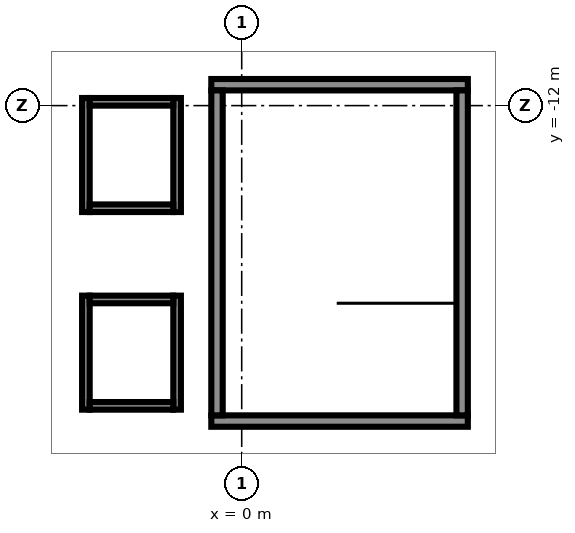
"""IFC4 building model, lengths in metres.
Left out: names, types, materials, properties, quantities, classifications, styles, units other than length and angle.
Written with IfcOpenShell. Run it as: python <this file> out.ifc"""

import sys

from ifc_helpers import new_model, si_unit, direction, frame, frame_2d, origin, origin_2d, place, context, subcontext, project, spatial, rectangle, extrude, element, fill, save


model = new_model("IFC4")
c1 = context("Model", 3, precision=1e-05, world=origin(), true_north=direction((0.0, 1.0)))
c2 = subcontext(c1, "Body", "Model", "MODEL_VIEW")
j1 = project(units=[si_unit("LENGTHUNIT", "METRE"), si_unit("PLANEANGLEUNIT", "RADIAN")], contexts=[c1])
p1 = place(None, origin())
s1 = spatial("IfcSite", under=j1, at=p1, CompositionType="ELEMENT")
p2 = place(p1, origin())
s2 = spatial("IfcBuilding", under=s1, at=p2, CompositionType="ELEMENT")
p3 = place(p2, origin())
s3 = spatial("IfcBuildingStorey", under=s2, at=p3, CompositionType="ELEMENT", Elevation=0.0)
p4 = place(p3, frame((-5.0, -17.0, 0.0), z_axis=(0.0, 0.0, 1.0), x_axis=(1.0, 0.0, 0.0)))
e1 = element("IfcColumn", 1, at=p4, inside=s3, PredefinedType="COLUMN", context=c2, shape_type="SweptSolid", body=[
    extrude(rectangle(XDim=1.0, YDim=1.0, at=origin_2d()), origin(), (0.0, 0.0, 1.0), 8.0),
])
p5 = place(p3, frame((-0.8, -20.3, 0.0), z_axis=(0.0, 0.0, 1.0), x_axis=(1.0, 0.0, 0.0)))
e2 = element("IfcWall", 2, at=p5, inside=s3, PredefinedType="SHEAR", context=c2, shape_type="SweptSolid", body=[
    extrude(rectangle(XDim=6.75, YDim=0.3, at=frame_2d((3.375, 0.0))), origin(), (0.0, 0.0, 1.0), 7.7),
])
p6 = place(p5, frame((2.175, 0.0, 0.0)))
e3 = element("IfcOpeningElement", 3, at=p6, cuts=e2, PredefinedType="OPENING", context=c2, shape_type="SweptSolid", body=[
    extrude(rectangle(XDim=2.4, YDim=2.1, at=frame_2d((1.2, 1.05))), frame((0.0, 0.16, 0.0), z_axis=(0.0, -1.0, 0.0), x_axis=(1.0, 0.0, 0.0)), (0.0, 0.0, 1.0), 0.32),
])
p7 = place(p3, frame((-0.8, -11.45, 0.0), z_axis=(0.0, 0.0, 1.0), x_axis=(1.0, 0.0, 0.0)))
e4 = element("IfcWall", 4, at=p7, inside=s3, PredefinedType="SHEAR", context=c2, shape_type="SweptSolid", body=[
    extrude(rectangle(XDim=6.75, YDim=0.3, at=frame_2d((3.375, 0.0))), origin(), (0.0, 0.0, 1.0), 7.7),
])
for number, where, z_axis, x_axis in (
    (5, (-0.65, -20.15, 0.0), (0.0, 0.0, 1.0), (0.0, 1.0, 0.0)),
    (6, (5.8, -20.15, 0.0), (0.0, 0.0, 1.0), (0.0, 1.0, 0.0)),
):
    element("IfcWall", number, at=place(p3, frame(where, z_axis=z_axis, x_axis=x_axis)), inside=s3, PredefinedType="SHEAR", context=c2, shape_type="SweptSolid", body=[
        extrude(rectangle(XDim=8.55, YDim=0.3, at=frame_2d((4.275, 0.0))), origin(), (0.0, 0.0, 1.0), 7.7),
    ])
p8 = place(p3, frame((-4.1, -20.0, 0.0), z_axis=(0.0, 0.0, 1.0), x_axis=(0.0, 1.0, 0.0)))
e7 = element("IfcWall", 7, at=p8, inside=s3, PredefinedType="PARTITIONING", context=c2, shape_type="SweptSolid", body=[
    extrude(rectangle(XDim=3.0, YDim=0.2, at=frame_2d((1.5, 0.0))), origin(), (0.0, 0.0, 1.0), 7.7),
])
p9 = place(p3, frame((-1.7, -20.0, 0.0), z_axis=(0.0, 0.0, 1.0), x_axis=(0.0, 1.0, 0.0)))
e8 = element("IfcWall", 8, at=p9, inside=s3, PredefinedType="PARTITIONING", context=c2, shape_type="SweptSolid", body=[
    extrude(rectangle(XDim=3.0, YDim=0.2, at=frame_2d((1.5, 0.0))), origin(), (0.0, 0.0, 1.0), 7.7),
])
p10 = place(p9, frame((0.95, 0.0, 0.0)))
e9 = element("IfcOpeningElement", 9, at=p10, cuts=e8, PredefinedType="OPENING", context=c2, shape_type="SweptSolid", body=[
    extrude(rectangle(XDim=1.1, YDim=2.1, at=frame_2d((0.55, 1.05))), frame((0.0, 0.11, 0.0), z_axis=(0.0, -1.0, 0.0), x_axis=(1.0, 0.0, 0.0)), (0.0, 0.0, 1.0), 0.22),
])
for number, where, z_axis, x_axis in (
    (10, (-4.0, -19.9, 0.0), (0.0, 0.0, 1.0), (1.0, 0.0, 0.0)),
    (11, (-4.0, -17.1, 0.0), (0.0, 0.0, 1.0), (1.0, 0.0, 0.0)),
):
    element("IfcWall", number, at=place(p3, frame(where, z_axis=z_axis, x_axis=x_axis)), inside=s3, PredefinedType="PARTITIONING", context=c2, shape_type="SweptSolid", body=[
        extrude(rectangle(XDim=2.2, YDim=0.2, at=frame_2d((1.1, 0.0))), origin(), (0.0, 0.0, 1.0), 7.7),
    ])
p11 = place(p3, frame((-4.1, -14.8, 0.0), z_axis=(0.0, 0.0, 1.0), x_axis=(0.0, 1.0, 0.0)))
e12 = element("IfcWall", 12, at=p11, inside=s3, PredefinedType="PARTITIONING", context=c2, shape_type="SweptSolid", body=[
    extrude(rectangle(XDim=3.0, YDim=0.2, at=frame_2d((1.5, 0.0))), origin(), (0.0, 0.0, 1.0), 7.7),
])
p12 = place(p3, frame((-1.7, -14.8, 0.0), z_axis=(0.0, 0.0, 1.0), x_axis=(0.0, 1.0, 0.0)))
e13 = element("IfcWall", 13, at=p12, inside=s3, PredefinedType="PARTITIONING", context=c2, shape_type="SweptSolid", body=[
    extrude(rectangle(XDim=3.0, YDim=0.2, at=frame_2d((1.5, 0.0))), origin(), (0.0, 0.0, 1.0), 7.7),
])
p13 = place(p12, frame((0.95, 0.0, 0.0)))
e14 = element("IfcOpeningElement", 14, at=p13, cuts=e13, PredefinedType="OPENING", context=c2, shape_type="SweptSolid", body=[
    extrude(rectangle(XDim=1.1, YDim=2.1, at=frame_2d((0.55, 1.05))), frame((0.0, 0.11, 0.0), z_axis=(0.0, -1.0, 0.0), x_axis=(1.0, 0.0, 0.0)), (0.0, 0.0, 1.0), 0.22),
])
for number, where, z_axis, x_axis in (
    (15, (-4.0, -14.7, 0.0), (0.0, 0.0, 1.0), (1.0, 0.0, 0.0)),
    (16, (-4.0, -11.9, 0.0), (0.0, 0.0, 1.0), (1.0, 0.0, 0.0)),
):
    element("IfcWall", number, at=place(p3, frame(where, z_axis=z_axis, x_axis=x_axis)), inside=s3, PredefinedType="PARTITIONING", context=c2, shape_type="SweptSolid", body=[
        extrude(rectangle(XDim=2.2, YDim=0.2, at=frame_2d((1.1, 0.0))), origin(), (0.0, 0.0, 1.0), 7.7),
    ])
p14 = place(p6, origin())
e17 = element("IfcDoor", 17, at=p14, inside=s3, OperationType="DOUBLE_DOOR_SINGLE_SWING", PredefinedType="DOOR", context=c2, shape_type="SweptSolid", body=[
    extrude(rectangle(XDim=2.4, YDim=2.1, at=frame_2d((1.2, 1.05))), frame((0.0, 0.025, 0.0), z_axis=(0.0, -1.0, 0.0), x_axis=(1.0, 0.0, 0.0)), (0.0, 0.0, 1.0), 0.05),
])
fill(e3, e17)
p15 = place(p10, origin())
e18 = element("IfcDoor", 18, at=p15, inside=s3, OperationType="DOUBLE_DOOR_SLIDING", PredefinedType="DOOR", context=c2, shape_type="SweptSolid", body=[
    extrude(rectangle(XDim=1.1, YDim=2.1, at=frame_2d((0.55, 1.05))), frame((0.0, 0.025, 0.0), z_axis=(0.0, -1.0, 0.0), x_axis=(1.0, 0.0, 0.0)), (0.0, 0.0, 1.0), 0.05),
])
fill(e9, e18)
p16 = place(p13, origin())
e19 = element("IfcDoor", 19, at=p16, inside=s3, OperationType="DOUBLE_DOOR_SLIDING", PredefinedType="DOOR", context=c2, shape_type="SweptSolid", body=[
    extrude(rectangle(XDim=1.1, YDim=2.1, at=frame_2d((0.55, 1.05))), frame((0.0, 0.025, 0.0), z_axis=(0.0, -1.0, 0.0), x_axis=(1.0, 0.0, 0.0)), (0.0, 0.0, 1.0), 0.05),
])
fill(e14, e19)
save(model, sys.argv[1])
